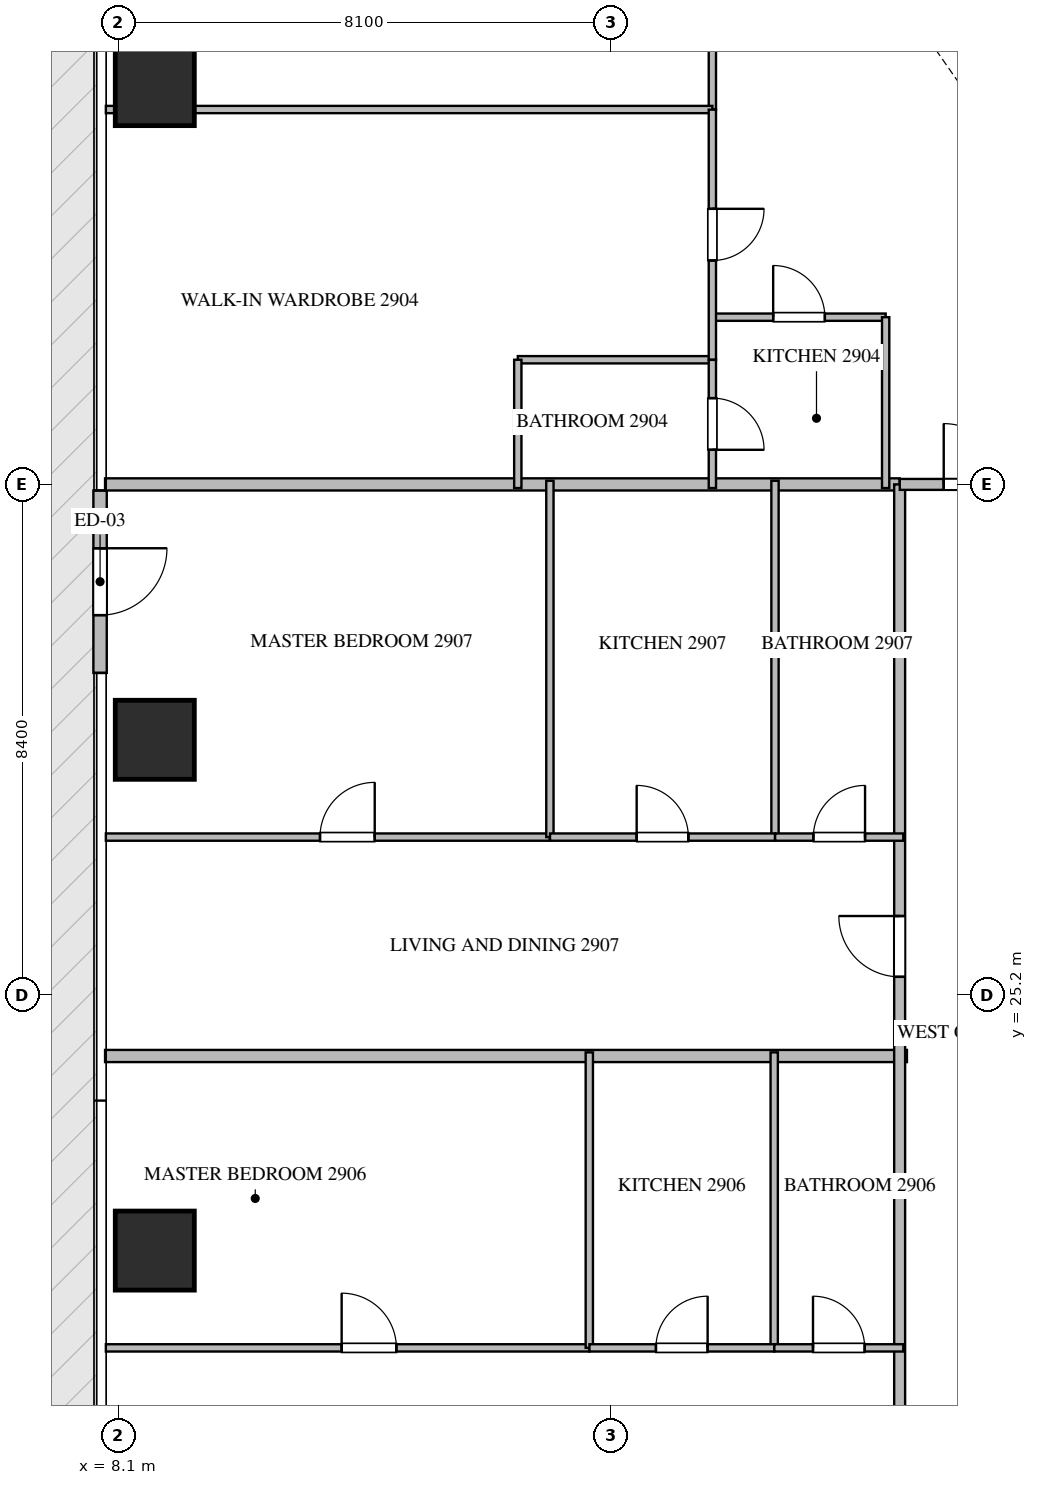
"""IFC4 building model, lengths in metres.
Left out: names, types, materials, properties, quantities, classifications, styles, units other than length and angle.
Written with IfcOpenShell. Run it as: python <this file> out.ifc"""

import sys

from ifc_helpers import new_model, si_unit, direction, frame, frame_2d, origin, origin_2d, place, context, subcontext, project, spatial, rectangle, extrude, source, transform, mapped, element, fill, save


model = new_model("IFC4")
c1 = context("Model", 3, precision=1e-05, world=origin(), true_north=direction((0.0, 1.0)))
c2 = subcontext(c1, "Body", "Model", "MODEL_VIEW")
j1 = project(units=[si_unit("LENGTHUNIT", "METRE"), si_unit("PLANEANGLEUNIT", "RADIAN")], contexts=[c1])
p1 = place(None, origin())
s1 = spatial("IfcSite", under=j1, at=p1, CompositionType="ELEMENT")
p2 = place(p1, origin())
s2 = spatial("IfcBuilding", under=s1, at=p2, CompositionType="ELEMENT")
p3 = place(p2, frame((0.0, 0.0, 120.15)))
s3 = spatial("IfcBuildingStorey", under=s2, at=p3, CompositionType="ELEMENT", Elevation=120.15)
m1 = source(origin(), c2, "Body", "SweptSolid", [
    extrude(rectangle(XDim=1.3, YDim=1.3, at=origin_2d()), origin(), (0.0, 0.0, 1.0), 3.93),
])
for number, where, z_axis, x_axis in (
    (1, (8.7, 21.0, -0.44), (0.0, 0.0, 1.0), (1.0, 0.0, 0.0)),
    (2, (8.7, 29.4, -0.44), (0.0, 0.0, 1.0), (1.0, 0.0, 0.0)),
    (3, (8.7, 40.15, -0.44), (0.0, 0.0, 1.0), (1.0, 0.0, 0.0)),
):
    element("IfcColumn", number, at=place(p3, frame(where, z_axis=z_axis, x_axis=x_axis)), inside=s3, PredefinedType="COLUMN", context=c2, shape_type="MappedRepresentation", body=[
        mapped(m1, transform((0.0, 0.0, 0.0), scale=1.0)),
    ])
p4 = place(p3, frame((7.8, 33.5, 0.0), z_axis=(0.0, 0.0, 1.0), x_axis=(0.0, -1.0, 0.0)))
e4 = element("IfcWall", 4, at=p4, inside=s3, PredefinedType="ELEMENTEDWALL", context=c2, shape_type="SweptSolid", body=[
    extrude(rectangle(XDim=3.0, YDim=0.22, at=frame_2d((1.5, 0.0))), origin(), (0.0, 0.0, 1.0), 3.475),
])
p5 = place(p4, frame((0.95, 0.0, 0.0)))
e5 = element("IfcOpeningElement", 5, at=p5, cuts=e4, PredefinedType="OPENING", context=c2, shape_type="SweptSolid", body=[
    extrude(rectangle(XDim=1.1, YDim=2.2, at=frame_2d((0.55, 1.1))), frame((0.0, 0.12, 0.0), z_axis=(0.0, -1.0, 0.0), x_axis=(1.0, 0.0, 0.0)), (0.0, 0.0, 1.0), 0.24),
])
p6 = place(p3, frame((7.882, 24.2, 0.0), z_axis=(0.0, 0.0, 1.0), x_axis=(1.0, 0.0, 0.0)))
e6 = element("IfcWall", 6, at=p6, inside=s3, PredefinedType="PARTITIONING", context=c2, shape_type="SweptSolid", body=[
    extrude(rectangle(XDim=13.188, YDim=0.2, at=frame_2d((6.594, 0.0))), origin(), (0.0, 0.0, 1.0), 3.49),
])
p7 = place(p3, frame((7.882, 33.6, 0.0), z_axis=(0.0, 0.0, 1.0), x_axis=(1.0, 0.0, 0.0)))
e7 = element("IfcWall", 7, at=p7, inside=s3, PredefinedType="PARTITIONING", context=c2, shape_type="SweptSolid", body=[
    extrude(rectangle(XDim=13.068, YDim=0.2, at=frame_2d((6.534, 0.0))), origin(), (0.0, 0.0, 1.0), 3.49),
])
p8 = place(p3, frame((20.95, 14.9, 0.0), z_axis=(0.0, 0.0, 1.0), x_axis=(0.0, 1.0, 0.0)))
e8 = element("IfcWall", 8, at=p8, inside=s3, PredefinedType="PARTITIONING", context=c2, shape_type="SweptSolid", body=[
    extrude(rectangle(XDim=18.7, YDim=0.18, at=frame_2d((9.35, 0.0))), origin(), (0.0, 0.0, 1.0), 3.49),
])
p9 = place(p8, frame((1.805, 0.0, 0.0)))
e9 = element("IfcOpeningElement", 9, at=p9, cuts=e8, PredefinedType="OPENING", context=c2, shape_type="SweptSolid", body=[
    extrude(rectangle(XDim=1.0, YDim=2.15, at=frame_2d((0.5, 1.075))), frame((0.0, 0.1, 0.0), z_axis=(0.0, -1.0, 0.0), x_axis=(1.0, 0.0, 0.0)), (0.0, 0.0, 1.0), 0.2),
])
p10 = place(p8, frame((10.602, 0.0, 0.0)))
e10 = element("IfcOpeningElement", 10, at=p10, cuts=e8, PredefinedType="OPENING", context=c2, shape_type="SweptSolid", body=[
    extrude(rectangle(XDim=1.0, YDim=2.15, at=frame_2d((0.5, 1.075))), frame((0.0, 0.1, 0.0), z_axis=(0.0, -1.0, 0.0), x_axis=(1.0, 0.0, 0.0)), (0.0, 0.0, 1.0), 0.2),
])
p11 = place(p3, frame((20.952, 33.6, 0.0), z_axis=(0.0, 0.0, 1.0), x_axis=(1.0, 0.0, 0.0)))
e11 = element("IfcWall", 11, at=p11, inside=s3, PredefinedType="PARTITIONING", context=c2, shape_type="SweptSolid", body=[
    extrude(rectangle(XDim=2.446, YDim=0.18, at=frame_2d((1.223, 0.0))), origin(), (0.0, 0.0, 1.0), 3.49),
])
p12 = place(p11, frame((0.723, 0.0, 0.0)))
e12 = element("IfcOpeningElement", 12, at=p12, cuts=e11, PredefinedType="OPENING", context=c2, shape_type="SweptSolid", body=[
    extrude(rectangle(XDim=1.0, YDim=2.15, at=frame_2d((0.5, 1.075))), frame((0.0, 0.1, 0.0), z_axis=(0.0, -1.0, 0.0), x_axis=(1.0, 0.0, 0.0)), (0.0, 0.0, 1.0), 0.2),
])
p13 = place(p3, frame((17.87, 36.35, 0.0), z_axis=(0.0, 0.0, 1.0), x_axis=(1.0, 0.0, 0.0)))
e13 = element("IfcWall", 13, at=p13, inside=s3, PredefinedType="PARTITIONING", context=c2, shape_type="SweptSolid", body=[
    extrude(rectangle(XDim=2.85, YDim=0.12, at=frame_2d((1.425, 0.0))), origin(), (0.0, 0.0, 1.0), 3.49),
])
p14 = place(p13, frame((1.0, 0.0, 0.0)))
e14 = element("IfcOpeningElement", 14, at=p14, cuts=e13, PredefinedType="OPENING", context=c2, shape_type="SweptSolid", body=[
    extrude(rectangle(XDim=0.85, YDim=2.1, at=frame_2d((0.425, 1.05))), frame((0.0, 0.07, 0.0), z_axis=(0.0, -1.0, 0.0), x_axis=(1.0, 0.0, 0.0)), (0.0, 0.0, 1.0), 0.14),
])
p15 = place(p3, frame((20.72, 36.35, 0.0), z_axis=(0.0, 0.0, 1.0), x_axis=(0.0, -1.0, 0.0)))
e15 = element("IfcWall", 15, at=p15, inside=s3, PredefinedType="PARTITIONING", context=c2, shape_type="SweptSolid", body=[
    extrude(rectangle(XDim=2.81, YDim=0.12, at=frame_2d((1.405, 0.0))), origin(), (0.0, 0.0, 1.0), 3.49),
])
p16 = place(p3, frame((17.87, 48.905, 0.0), z_axis=(0.0, 0.0, 1.0), x_axis=(0.0, -1.0, 0.0)))
e16 = element("IfcWall", 16, at=p16, inside=s3, PredefinedType="PARTITIONING", context=c2, shape_type="SweptSolid", body=[
    extrude(rectangle(XDim=9.14, YDim=0.12, at=frame_2d((4.57, 0.0))), origin(), (0.0, 0.0, 1.0), 3.49),
])
p17 = place(p16, frame((4.532, 0.0, 0.0)))
e17 = element("IfcOpeningElement", 17, at=p17, cuts=e16, PredefinedType="OPENING", context=c2, shape_type="SweptSolid", body=[
    extrude(rectangle(XDim=0.9, YDim=2.1, at=frame_2d((0.45, 1.05))), frame((0.0, 0.07, 0.0), z_axis=(0.0, -1.0, 0.0), x_axis=(1.0, 0.0, 0.0)), (0.0, 0.0, 1.0), 0.14),
])
p18 = place(p3, frame((7.895, 39.765, 0.0), z_axis=(0.0, 0.0, 1.0), x_axis=(1.0, 0.0, 0.0)))
e18 = element("IfcWall", 18, at=p18, inside=s3, PredefinedType="PARTITIONING", context=c2, shape_type="SweptSolid", body=[
    extrude(rectangle(XDim=9.975, YDim=0.12, at=frame_2d((4.988, 0.0))), origin(), (0.0, 0.0, 1.0), 3.49),
])
p19 = place(p3, frame((14.67, 35.65, 0.0), z_axis=(0.0, 0.0, 1.0), x_axis=(1.0, 0.0, 0.0)))
e19 = element("IfcWall", 19, at=p19, inside=s3, PredefinedType="PARTITIONING", context=c2, shape_type="SweptSolid", body=[
    extrude(rectangle(XDim=3.2, YDim=0.12, at=frame_2d((1.6, 0.0))), origin(), (0.0, 0.0, 1.0), 3.49),
])
p20 = place(p3, frame((14.67, 35.65, 0.0), z_axis=(0.0, 0.0, 1.0), x_axis=(0.0, -1.0, 0.0)))
e20 = element("IfcWall", 20, at=p20, inside=s3, PredefinedType="PARTITIONING", context=c2, shape_type="SweptSolid", body=[
    extrude(rectangle(XDim=2.11, YDim=0.12, at=frame_2d((1.055, 0.0))), origin(), (0.0, 0.0, 1.0), 3.49),
])
p21 = place(p3, frame((17.87, 39.763, 0.0), z_axis=(0.0, 0.0, 1.0), x_axis=(0.0, -1.0, 0.0)))
e21 = element("IfcWall", 21, at=p21, inside=s3, PredefinedType="PARTITIONING", context=c2, shape_type="SweptSolid", body=[
    extrude(rectangle(XDim=4.113, YDim=0.12, at=frame_2d((2.057, 0.0))), origin(), (0.0, 0.0, 1.0), 3.49),
])
p22 = place(p21, frame((1.631, 0.0, 0.0)))
e22 = element("IfcOpeningElement", 22, at=p22, cuts=e21, PredefinedType="OPENING", context=c2, shape_type="SweptSolid", body=[
    extrude(rectangle(XDim=0.85, YDim=2.1, at=frame_2d((0.425, 1.05))), frame((0.0, 0.07, 0.0), z_axis=(0.0, -1.0, 0.0), x_axis=(1.0, 0.0, 0.0)), (0.0, 0.0, 1.0), 0.14),
])
p23 = place(p3, frame((17.87, 35.648, 0.0), z_axis=(0.0, 0.0, 1.0), x_axis=(0.0, -1.0, 0.0)))
e23 = element("IfcWall", 23, at=p23, inside=s3, PredefinedType="PARTITIONING", context=c2, shape_type="SweptSolid", body=[
    extrude(rectangle(XDim=2.108, YDim=0.12, at=frame_2d((1.054, 0.0))), origin(), (0.0, 0.0, 1.0), 3.49),
])
p24 = place(p23, frame((0.629, 0.0, 0.0)))
e24 = element("IfcOpeningElement", 24, at=p24, cuts=e23, PredefinedType="OPENING", context=c2, shape_type="SweptSolid", body=[
    extrude(rectangle(XDim=0.85, YDim=2.1, at=frame_2d((0.425, 1.05))), frame((0.0, 0.07, 0.0), z_axis=(0.0, -1.0, 0.0), x_axis=(1.0, 0.0, 0.0)), (0.0, 0.0, 1.0), 0.14),
])
p25 = place(p3, frame((7.895, 19.4, 0.0), z_axis=(0.0, 0.0, 1.0), x_axis=(1.0, 0.0, 0.0)))
e25 = element("IfcWall", 25, at=p25, inside=s3, PredefinedType="PARTITIONING", context=c2, shape_type="SweptSolid", body=[
    extrude(rectangle(XDim=7.951, YDim=0.12, at=frame_2d((3.976, 0.0))), origin(), (0.0, 0.0, 1.0), 3.49),
])
p26 = place(p25, frame((3.878, 0.0, 0.0)))
e26 = element("IfcOpeningElement", 26, at=p26, cuts=e25, PredefinedType="OPENING", context=c2, shape_type="SweptSolid", body=[
    extrude(rectangle(XDim=0.9, YDim=2.1, at=frame_2d((0.45, 1.05))), frame((0.0, 0.07, 0.0), z_axis=(0.0, -1.0, 0.0), x_axis=(1.0, 0.0, 0.0)), (0.0, 0.0, 1.0), 0.14),
])
for number, where, z_axis, x_axis in (
    (27, (15.846, 19.4, 0.0), (0.0, 0.0, 1.0), (0.0, 1.0, 0.0)),
    (28, (18.887, 19.4, 0.0), (0.0, 0.0, 1.0), (0.0, 1.0, 0.0)),
):
    element("IfcWall", number, at=place(p3, frame(where, z_axis=z_axis, x_axis=x_axis)), inside=s3, PredefinedType="PARTITIONING", context=c2, shape_type="SweptSolid", body=[
        extrude(rectangle(XDim=4.86, YDim=0.12, at=frame_2d((2.43, 0.0))), origin(), (0.0, 0.0, 1.0), 3.49),
    ])
p27 = place(p3, frame((15.848, 19.4, 0.0), z_axis=(0.0, 0.0, 1.0), x_axis=(1.0, 0.0, 0.0)))
e29 = element("IfcWall", 29, at=p27, inside=s3, PredefinedType="PARTITIONING", context=c2, shape_type="SweptSolid", body=[
    extrude(rectangle(XDim=3.039, YDim=0.12, at=frame_2d((1.52, 0.0))), origin(), (0.0, 0.0, 1.0), 3.49),
])
p28 = place(p27, frame((1.094, 0.0, 0.0)))
e30 = element("IfcOpeningElement", 30, at=p28, cuts=e29, PredefinedType="OPENING", context=c2, shape_type="SweptSolid", body=[
    extrude(rectangle(XDim=0.85, YDim=2.1, at=frame_2d((0.425, 1.05))), frame((0.0, 0.07, 0.0), z_axis=(0.0, -1.0, 0.0), x_axis=(1.0, 0.0, 0.0)), (0.0, 0.0, 1.0), 0.14),
])
p29 = place(p3, frame((18.889, 19.4, 0.0), z_axis=(0.0, 0.0, 1.0), x_axis=(1.0, 0.0, 0.0)))
e31 = element("IfcWall", 31, at=p29, inside=s3, PredefinedType="PARTITIONING", context=c2, shape_type="SweptSolid", body=[
    extrude(rectangle(XDim=2.121, YDim=0.12, at=frame_2d((1.061, 0.0))), origin(), (0.0, 0.0, 1.0), 3.49),
])
p30 = place(p29, frame((0.636, 0.0, 0.0)))
e32 = element("IfcOpeningElement", 32, at=p30, cuts=e31, PredefinedType="OPENING", context=c2, shape_type="SweptSolid", body=[
    extrude(rectangle(XDim=0.85, YDim=2.1, at=frame_2d((0.425, 1.05))), frame((0.0, 0.07, 0.0), z_axis=(0.0, -1.0, 0.0), x_axis=(1.0, 0.0, 0.0)), (0.0, 0.0, 1.0), 0.14),
])
p31 = place(p3, frame((7.895, 27.8, 0.0), z_axis=(0.0, 0.0, 1.0), x_axis=(1.0, 0.0, 0.0)))
e33 = element("IfcWall", 33, at=p31, inside=s3, PredefinedType="PARTITIONING", context=c2, shape_type="SweptSolid", body=[
    extrude(rectangle(XDim=7.303, YDim=0.12, at=frame_2d((3.651, 0.0))), origin(), (0.0, 0.0, 1.0), 3.49),
])
p32 = place(p31, frame((3.522, 0.0, 0.0)))
e34 = element("IfcOpeningElement", 34, at=p32, cuts=e33, PredefinedType="OPENING", context=c2, shape_type="SweptSolid", body=[
    extrude(rectangle(XDim=0.9, YDim=2.1, at=frame_2d((0.45, 1.05))), frame((0.0, 0.07, 0.0), z_axis=(0.0, -1.0, 0.0), x_axis=(1.0, 0.0, 0.0)), (0.0, 0.0, 1.0), 0.14),
])
for number, where, z_axis, x_axis in (
    (35, (15.198, 27.8, 0.0), (0.0, 0.0, 1.0), (0.0, 1.0, 0.0)),
    (36, (18.9, 27.8, 0.0), (0.0, 0.0, 1.0), (0.0, 1.0, 0.0)),
):
    element("IfcWall", number, at=place(p3, frame(where, z_axis=z_axis, x_axis=x_axis)), inside=s3, PredefinedType="PARTITIONING", context=c2, shape_type="SweptSolid", body=[
        extrude(rectangle(XDim=5.86, YDim=0.12, at=frame_2d((2.93, 0.0))), origin(), (0.0, 0.0, 1.0), 3.49),
    ])
p33 = place(p3, frame((15.2, 27.8, 0.0), z_axis=(0.0, 0.0, 1.0), x_axis=(1.0, 0.0, 0.0)))
e37 = element("IfcWall", 37, at=p33, inside=s3, PredefinedType="PARTITIONING", context=c2, shape_type="SweptSolid", body=[
    extrude(rectangle(XDim=3.7, YDim=0.12, at=frame_2d((1.85, 0.0))), origin(), (0.0, 0.0, 1.0), 3.49),
])
p34 = place(p33, frame((1.425, 0.0, 0.0)))
e38 = element("IfcOpeningElement", 38, at=p34, cuts=e37, PredefinedType="OPENING", context=c2, shape_type="SweptSolid", body=[
    extrude(rectangle(XDim=0.85, YDim=2.1, at=frame_2d((0.425, 1.05))), frame((0.0, 0.07, 0.0), z_axis=(0.0, -1.0, 0.0), x_axis=(1.0, 0.0, 0.0)), (0.0, 0.0, 1.0), 0.14),
])
p35 = place(p3, frame((18.902, 27.8, 0.0), z_axis=(0.0, 0.0, 1.0), x_axis=(1.0, 0.0, 0.0)))
e39 = element("IfcWall", 39, at=p35, inside=s3, PredefinedType="PARTITIONING", context=c2, shape_type="SweptSolid", body=[
    extrude(rectangle(XDim=2.108, YDim=0.12, at=frame_2d((1.054, 0.0))), origin(), (0.0, 0.0, 1.0), 3.49),
])
p36 = place(p35, frame((0.629, 0.0, 0.0)))
e40 = element("IfcOpeningElement", 40, at=p36, cuts=e39, PredefinedType="OPENING", context=c2, shape_type="SweptSolid", body=[
    extrude(rectangle(XDim=0.85, YDim=2.1, at=frame_2d((0.425, 1.05))), frame((0.0, 0.07, 0.0), z_axis=(0.0, -1.0, 0.0), x_axis=(1.0, 0.0, 0.0)), (0.0, 0.0, 1.0), 0.14),
])
m2 = source(origin(), c2, "Body", "SweptSolid", [
    extrude(rectangle(XDim=1.1, YDim=2.2, at=frame_2d((0.55, 1.1))), frame((0.0, 0.025, 0.0), z_axis=(0.0, -1.0, 0.0), x_axis=(1.0, 0.0, 0.0)), (0.0, 0.0, 1.0), 0.05),
])
p37 = place(p5, origin())
e41 = element("IfcDoor", 41, at=p37, inside=s3, OperationType="SINGLE_SWING_LEFT", PredefinedType="DOOR", context=c2, shape_type="MappedRepresentation", body=[
    mapped(m2, transform((0.0, 0.0, 0.0), scale=1.0)),
])
fill(e5, e41)
m3 = source(origin(), c2, "Body", "SweptSolid", [
    extrude(rectangle(XDim=1.0, YDim=2.15, at=frame_2d((0.5, 1.075))), frame((0.0, 0.025, 0.0), z_axis=(0.0, -1.0, 0.0), x_axis=(1.0, 0.0, 0.0)), (0.0, 0.0, 1.0), 0.05),
])
p38 = place(p10, origin())
e42 = element("IfcDoor", 42, at=p38, inside=s3, OperationType="SINGLE_SWING_RIGHT", PredefinedType="DOOR", context=c2, shape_type="MappedRepresentation", body=[
    mapped(m3, transform((0.0, 0.0, 0.0), scale=1.0)),
])
fill(e10, e42)
p39 = place(p12, origin())
e43 = element("IfcDoor", 43, at=p39, inside=s3, OperationType="SINGLE_SWING_LEFT", PredefinedType="DOOR", context=c2, shape_type="MappedRepresentation", body=[
    mapped(m3, transform((0.0, 0.0, 0.0), scale=1.0)),
])
fill(e12, e43)
m4 = source(origin(), c2, "Body", "SweptSolid", [
    extrude(rectangle(XDim=0.85, YDim=2.1, at=frame_2d((0.425, 1.05))), frame((0.0, 0.025, 0.0), z_axis=(0.0, -1.0, 0.0), x_axis=(1.0, 0.0, 0.0)), (0.0, 0.0, 1.0), 0.05),
])
p40 = place(p14, origin())
e44 = element("IfcDoor", 44, at=p40, inside=s3, OperationType="SINGLE_SWING_LEFT", PredefinedType="DOOR", context=c2, shape_type="MappedRepresentation", body=[
    mapped(m4, transform((0.0, 0.0, 0.0), scale=1.0)),
])
fill(e14, e44)
p41 = place(p22, origin())
e45 = element("IfcDoor", 45, at=p41, inside=s3, OperationType="SINGLE_SWING_LEFT", PredefinedType="DOOR", context=c2, shape_type="MappedRepresentation", body=[
    mapped(m4, transform((0.0, 0.0, 0.0), scale=1.0)),
])
fill(e22, e45)
p42 = place(p24, origin())
e46 = element("IfcDoor", 46, at=p42, inside=s3, OperationType="SINGLE_SWING_RIGHT", PredefinedType="DOOR", context=c2, shape_type="MappedRepresentation", body=[
    mapped(m4, transform((0.0, 0.0, 0.0), scale=1.0)),
])
fill(e24, e46)
m5 = source(origin(), c2, "Body", "SweptSolid", [
    extrude(rectangle(XDim=0.9, YDim=2.1, at=frame_2d((0.45, 1.05))), frame((0.0, 0.025, 0.0), z_axis=(0.0, -1.0, 0.0), x_axis=(1.0, 0.0, 0.0)), (0.0, 0.0, 1.0), 0.05),
])
p43 = place(p26, origin())
e47 = element("IfcDoor", 47, at=p43, inside=s3, OperationType="SINGLE_SWING_LEFT", PredefinedType="DOOR", context=c2, shape_type="MappedRepresentation", body=[
    mapped(m5, transform((0.0, 0.0, 0.0), scale=1.0)),
])
fill(e26, e47)
p44 = place(p28, origin())
e48 = element("IfcDoor", 48, at=p44, inside=s3, OperationType="SINGLE_SWING_RIGHT", PredefinedType="DOOR", context=c2, shape_type="MappedRepresentation", body=[
    mapped(m4, transform((0.0, 0.0, 0.0), scale=1.0)),
])
fill(e30, e48)
p45 = place(p30, origin())
e49 = element("IfcDoor", 49, at=p45, inside=s3, OperationType="SINGLE_SWING_LEFT", PredefinedType="DOOR", context=c2, shape_type="MappedRepresentation", body=[
    mapped(m4, transform((0.0, 0.0, 0.0), scale=1.0)),
])
fill(e32, e49)
p46 = place(p32, origin())
e50 = element("IfcDoor", 50, at=p46, inside=s3, OperationType="SINGLE_SWING_RIGHT", PredefinedType="DOOR", context=c2, shape_type="MappedRepresentation", body=[
    mapped(m5, transform((0.0, 0.0, 0.0), scale=1.0)),
])
fill(e34, e50)
p47 = place(p34, origin())
e51 = element("IfcDoor", 51, at=p47, inside=s3, OperationType="SINGLE_SWING_LEFT", PredefinedType="DOOR", context=c2, shape_type="MappedRepresentation", body=[
    mapped(m4, transform((0.0, 0.0, 0.0), scale=1.0)),
])
fill(e38, e51)
p48 = place(p36, origin())
e52 = element("IfcDoor", 52, at=p48, inside=s3, OperationType="SINGLE_SWING_RIGHT", PredefinedType="DOOR", context=c2, shape_type="MappedRepresentation", body=[
    mapped(m4, transform((0.0, 0.0, 0.0), scale=1.0)),
])
fill(e40, e52)
save(model, sys.argv[1])
